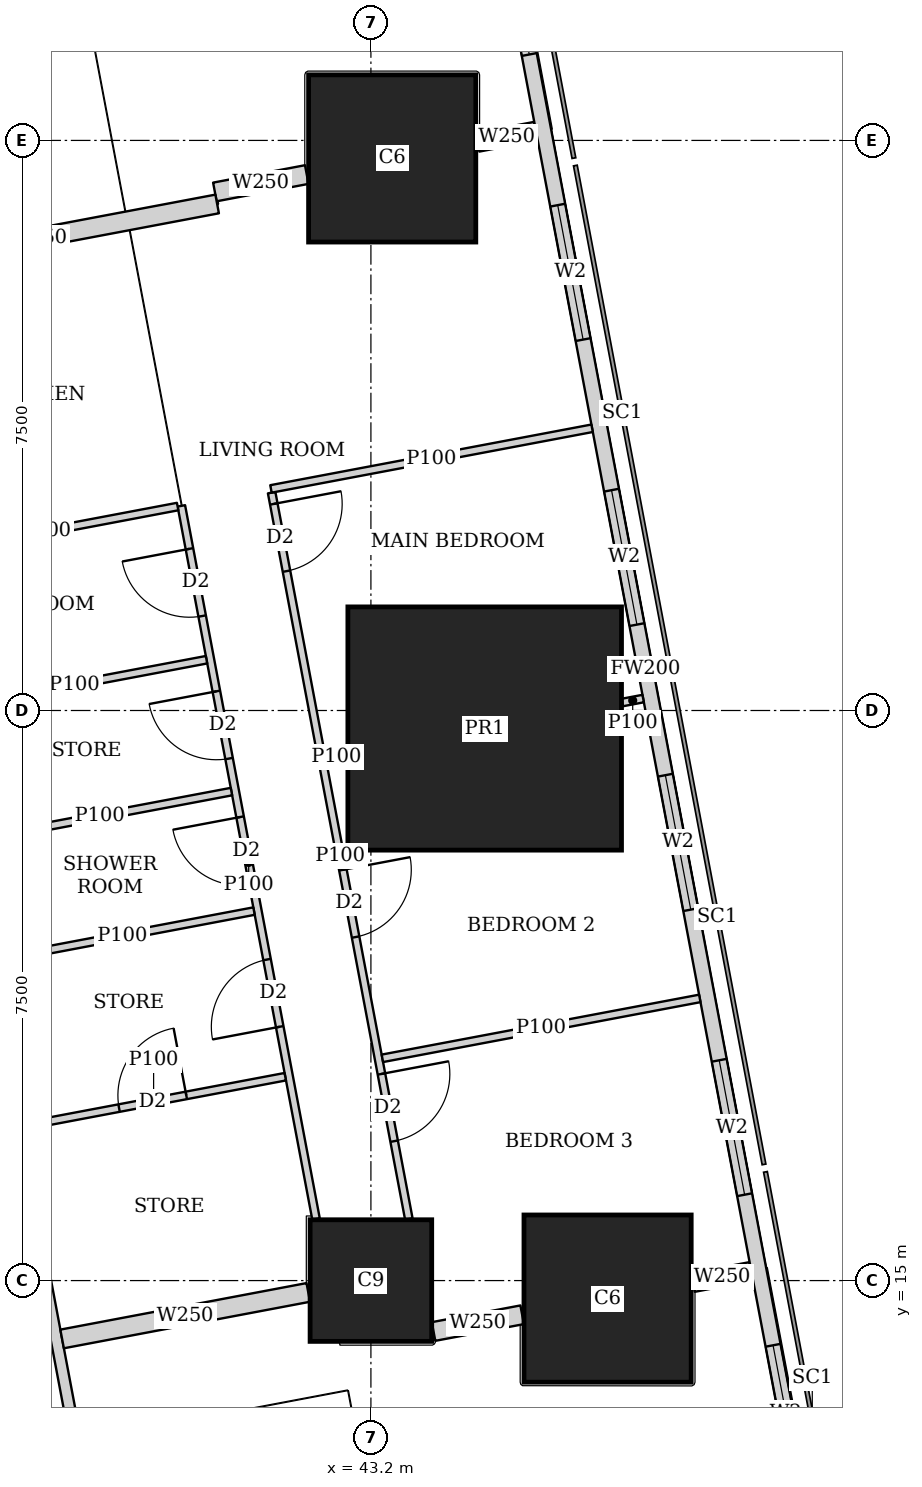
"""IFC4 building model, lengths in metres.
Left out: names, types, materials, properties, quantities, classifications, styles, units other than length and angle.
Written with IfcOpenShell. Run it as: python <this file> out.ifc"""

import sys

from ifc_helpers import new_model, si_unit, direction, frame, frame_2d, origin, origin_2d, place, context, subcontext, project, spatial, rectangle, extrude, element, fill, save


model = new_model("IFC4")
c1 = context("Model", 3, precision=1e-05, world=origin(), true_north=direction((0.0, 1.0)))
c2 = subcontext(c1, "Body", "Model", "MODEL_VIEW")
j1 = project(units=[si_unit("LENGTHUNIT", "METRE"), si_unit("PLANEANGLEUNIT", "RADIAN")], contexts=[c1])
p1 = place(None, origin())
s1 = spatial("IfcSite", under=j1, at=p1, CompositionType="ELEMENT")
p2 = place(p1, origin())
s2 = spatial("IfcBuilding", under=s1, at=p2, CompositionType="ELEMENT")
p3 = place(p2, frame((0.0, 0.0, 89.15)))
s3 = spatial("IfcBuildingStorey", under=s2, at=p3, CompositionType="ELEMENT", Elevation=89.15)
p4 = place(p3, frame((43.2, 15.0, 0.0), z_axis=(0.0, 0.0, 1.0), x_axis=(1.0, 0.0, 0.0)))
e1 = element("IfcColumn", 1, at=p4, inside=s3, PredefinedType="COLUMN", context=c2, shape_type="SweptSolid", body=[
    extrude(rectangle(XDim=1.6, YDim=1.6, at=origin_2d()), origin(), (0.0, 0.0, 1.0), 3.75),
])
p5 = place(p3, frame((46.314, 14.763, 0.0), z_axis=(0.0, 0.0, 1.0), x_axis=(1.0, 0.0, 0.0)))
e2 = element("IfcColumn", 2, at=p5, inside=s3, PredefinedType="COLUMN", context=c2, shape_type="SweptSolid", body=[
    extrude(rectangle(XDim=2.2, YDim=2.2, at=origin_2d()), origin(), (0.0, 0.0, 1.0), 3.75),
])
p6 = place(p3, frame((44.697, 22.263, 0.0), z_axis=(0.0, 0.0, 1.0), x_axis=(1.0, 0.0, 0.0)))
e3 = element("IfcColumn", 3, at=p6, inside=s3, PredefinedType="COLUMN", context=c2, shape_type="SweptSolid", body=[
    extrude(rectangle(XDim=3.6, YDim=3.2, at=origin_2d()), origin(), (0.0, 0.0, 1.0), 3.75),
])
p7 = place(p3, frame((43.48, 29.763, 0.0), z_axis=(0.0, 0.0, 1.0), x_axis=(1.0, 0.0, 0.0)))
e4 = element("IfcColumn", 4, at=p7, inside=s3, PredefinedType="COLUMN", context=c2, shape_type="SweptSolid", body=[
    extrude(rectangle(XDim=2.2, YDim=2.2, at=origin_2d()), origin(), (0.0, 0.0, 1.0), 3.75),
])
p8 = place(p3, frame((50.653, 2.703, 0.0), z_axis=(0.0, 0.0, 1.0), x_axis=(-0.185612026696, 0.982623109613, 0.0)))
e5 = element("IfcWall", 5, at=p8, inside=s3, PredefinedType="SOLIDWALL", context=c2, shape_type="SweptSolid", body=[
    extrude(rectangle(XDim=41.393, YDim=0.2, at=frame_2d((20.697, 0.0))), origin(), (0.0, 0.0, 1.0), 3.5),
])
p9 = place(p8, frame((1.633, 0.0, 0.9)))
e6 = element("IfcOpeningElement", 6, at=p9, cuts=e5, PredefinedType="OPENING", context=c2, shape_type="SweptSolid", body=[
    extrude(rectangle(XDim=1.8, YDim=1.5, at=frame_2d((0.9, 0.75))), frame((0.0, 0.11, 0.0), z_axis=(0.0, -1.0, 0.0), x_axis=(1.0, 0.0, 0.0)), (0.0, 0.0, 1.0), 0.22),
])
p10 = place(p8, frame((6.032, 0.0, 0.9)))
e7 = element("IfcOpeningElement", 7, at=p10, cuts=e5, PredefinedType="OPENING", context=c2, shape_type="SweptSolid", body=[
    extrude(rectangle(XDim=1.8, YDim=1.5, at=frame_2d((0.9, 0.75))), frame((0.0, 0.11, 0.0), z_axis=(0.0, -1.0, 0.0), x_axis=(1.0, 0.0, 0.0)), (0.0, 0.0, 1.0), 0.22),
])
p11 = place(p8, frame((9.848, 0.0, 0.9)))
e8 = element("IfcOpeningElement", 8, at=p11, cuts=e5, PredefinedType="OPENING", context=c2, shape_type="SweptSolid", body=[
    extrude(rectangle(XDim=1.8, YDim=1.5, at=frame_2d((0.9, 0.75))), frame((0.0, 0.11, 0.0), z_axis=(0.0, -1.0, 0.0), x_axis=(1.0, 0.0, 0.0)), (0.0, 0.0, 1.0), 0.22),
])
p12 = place(p8, frame((13.664, 0.0, 0.9)))
e9 = element("IfcOpeningElement", 9, at=p12, cuts=e5, PredefinedType="OPENING", context=c2, shape_type="SweptSolid", body=[
    extrude(rectangle(XDim=1.8, YDim=1.5, at=frame_2d((0.9, 0.75))), frame((0.0, 0.11, 0.0), z_axis=(0.0, -1.0, 0.0), x_axis=(1.0, 0.0, 0.0)), (0.0, 0.0, 1.0), 0.22),
])
p13 = place(p8, frame((17.481, 0.0, 0.9)))
e10 = element("IfcOpeningElement", 10, at=p13, cuts=e5, PredefinedType="OPENING", context=c2, shape_type="SweptSolid", body=[
    extrude(rectangle(XDim=1.8, YDim=1.5, at=frame_2d((0.9, 0.75))), frame((0.0, 0.11, 0.0), z_axis=(0.0, -1.0, 0.0), x_axis=(1.0, 0.0, 0.0)), (0.0, 0.0, 1.0), 0.22),
])
p14 = place(p8, frame((21.297, 0.0, 0.9)))
e11 = element("IfcOpeningElement", 11, at=p14, cuts=e5, PredefinedType="OPENING", context=c2, shape_type="SweptSolid", body=[
    extrude(rectangle(XDim=1.8, YDim=1.5, at=frame_2d((0.9, 0.75))), frame((0.0, 0.11, 0.0), z_axis=(0.0, -1.0, 0.0), x_axis=(1.0, 0.0, 0.0)), (0.0, 0.0, 1.0), 0.22),
])
p15 = place(p8, frame((25.113, 0.0, 0.9)))
e12 = element("IfcOpeningElement", 12, at=p15, cuts=e5, PredefinedType="OPENING", context=c2, shape_type="SweptSolid", body=[
    extrude(rectangle(XDim=1.8, YDim=1.5, at=frame_2d((0.9, 0.75))), frame((0.0, 0.11, 0.0), z_axis=(0.0, -1.0, 0.0), x_axis=(1.0, 0.0, 0.0)), (0.0, 0.0, 1.0), 0.22),
])
p16 = place(p8, frame((28.93, 0.0, 0.9)))
e13 = element("IfcOpeningElement", 13, at=p16, cuts=e5, PredefinedType="OPENING", context=c2, shape_type="SweptSolid", body=[
    extrude(rectangle(XDim=1.8, YDim=1.5, at=frame_2d((0.9, 0.75))), frame((0.0, 0.11, 0.0), z_axis=(0.0, -1.0, 0.0), x_axis=(1.0, 0.0, 0.0)), (0.0, 0.0, 1.0), 0.22),
])
p17 = place(p8, frame((32.746, 0.0, 0.9)))
e14 = element("IfcOpeningElement", 14, at=p17, cuts=e5, PredefinedType="OPENING", context=c2, shape_type="SweptSolid", body=[
    extrude(rectangle(XDim=1.8, YDim=1.5, at=frame_2d((0.9, 0.75))), frame((0.0, 0.11, 0.0), z_axis=(0.0, -1.0, 0.0), x_axis=(1.0, 0.0, 0.0)), (0.0, 0.0, 1.0), 0.22),
])
p18 = place(p8, frame((36.481, 0.0, 0.9)))
e15 = element("IfcOpeningElement", 15, at=p18, cuts=e5, PredefinedType="OPENING", context=c2, shape_type="SweptSolid", body=[
    extrude(rectangle(XDim=1.8, YDim=1.5, at=frame_2d((0.9, 0.75))), frame((0.0, 0.11, 0.0), z_axis=(0.0, -1.0, 0.0), x_axis=(1.0, 0.0, 0.0)), (0.0, 0.0, 1.0), 0.22),
])
p19 = place(p3, frame((33.127, 45.65, 0.0), z_axis=(0.0, 0.0, 1.0), x_axis=(0.185598547723, -0.98262565562, 0.0)))
e16 = element("IfcWall", 16, at=p19, inside=s3, PredefinedType="SOLIDWALL", context=c2, shape_type="SweptSolid", body=[
    extrude(rectangle(XDim=47.118, YDim=0.15, at=frame_2d((23.559, 0.0))), origin(), (0.0, 0.0, 1.0), 2.2),
])
p20 = place(p19, frame((15.285, 0.0, 0.0)))
e17 = element("IfcOpeningElement", 17, at=p20, cuts=e16, PredefinedType="OPENING", context=c2, shape_type="SweptSolid", body=[
    extrude(rectangle(XDim=1.0, YDim=2.1, at=frame_2d((0.5, 1.05))), frame((0.0, 0.085, 0.0), z_axis=(0.0, -1.0, 0.0), x_axis=(1.0, 0.0, 0.0)), (0.0, 0.0, 1.0), 0.17),
])
p21 = place(p19, frame((19.102, 0.0, 0.0)))
e18 = element("IfcOpeningElement", 18, at=p21, cuts=e16, PredefinedType="OPENING", context=c2, shape_type="SweptSolid", body=[
    extrude(rectangle(XDim=1.0, YDim=2.1, at=frame_2d((0.5, 1.05))), frame((0.0, 0.085, 0.0), z_axis=(0.0, -1.0, 0.0), x_axis=(1.0, 0.0, 0.0)), (0.0, 0.0, 1.0), 0.17),
])
p22 = place(p19, frame((33.88, 0.0, 0.0)))
e19 = element("IfcOpeningElement", 19, at=p22, cuts=e16, PredefinedType="OPENING", context=c2, shape_type="SweptSolid", body=[
    extrude(rectangle(XDim=1.0, YDim=2.1, at=frame_2d((0.5, 1.05))), frame((0.0, 0.085, 0.0), z_axis=(0.0, -1.0, 0.0), x_axis=(1.0, 0.0, 0.0)), (0.0, 0.0, 1.0), 0.17),
])
p23 = place(p3, frame((41.894, 25.366, 0.0), z_axis=(0.0, 0.0, 1.0), x_axis=(0.185599502781, -0.982625475228, 0.0)))
e20 = element("IfcWall", 20, at=p23, inside=s3, PredefinedType="PARTITIONING", context=c2, shape_type="SweptSolid", body=[
    extrude(rectangle(XDim=9.725, YDim=0.1, at=frame_2d((4.862, 0.0))), origin(), (0.0, 0.0, 1.0), 2.5),
])
p24 = place(p23, frame((0.151, 0.0, 0.0)))
e21 = element("IfcOpeningElement", 21, at=p24, cuts=e20, PredefinedType="OPENING", context=c2, shape_type="SweptSolid", body=[
    extrude(rectangle(XDim=0.9, YDim=2.1, at=frame_2d((0.45, 1.05))), frame((0.0, 0.06, 0.0), z_axis=(0.0, -1.0, 0.0), x_axis=(1.0, 0.0, 0.0)), (0.0, 0.0, 1.0), 0.12),
])
p25 = place(p23, frame((5.05, 0.0, 0.0)))
e22 = element("IfcOpeningElement", 22, at=p25, cuts=e20, PredefinedType="OPENING", context=c2, shape_type="SweptSolid", body=[
    extrude(rectangle(XDim=0.9, YDim=2.1, at=frame_2d((0.45, 1.05))), frame((0.0, 0.06, 0.0), z_axis=(0.0, -1.0, 0.0), x_axis=(1.0, 0.0, 0.0)), (0.0, 0.0, 1.0), 0.12),
])
p26 = place(p23, frame((7.783, 0.0, 0.0)))
e23 = element("IfcOpeningElement", 23, at=p26, cuts=e20, PredefinedType="OPENING", context=c2, shape_type="SweptSolid", body=[
    extrude(rectangle(XDim=0.9, YDim=2.1, at=frame_2d((0.45, 1.05))), frame((0.0, 0.06, 0.0), z_axis=(0.0, -1.0, 0.0), x_axis=(1.0, 0.0, 0.0)), (0.0, 0.0, 1.0), 0.12),
])
p27 = place(p3, frame((40.706, 25.192, 0.0), z_axis=(0.0, 0.0, 1.0), x_axis=(0.185591412258, -0.982627003342, 0.0)))
e24 = element("IfcWall", 24, at=p27, inside=s3, PredefinedType="PARTITIONING", context=c2, shape_type="SweptSolid", body=[
    extrude(rectangle(XDim=9.548, YDim=0.1, at=frame_2d((4.774, 0.0))), origin(), (0.0, 0.0, 1.0), 2.5),
])
p28 = place(p27, frame((0.575, 0.0, 0.0)))
e25 = element("IfcOpeningElement", 25, at=p28, cuts=e24, PredefinedType="OPENING", context=c2, shape_type="SweptSolid", body=[
    extrude(rectangle(XDim=0.9, YDim=2.1, at=frame_2d((0.45, 1.05))), frame((0.0, 0.06, 0.0), z_axis=(0.0, -1.0, 0.0), x_axis=(1.0, 0.0, 0.0)), (0.0, 0.0, 1.0), 0.12),
])
p29 = place(p27, frame((4.166, 0.0, 0.0)))
e26 = element("IfcOpeningElement", 26, at=p29, cuts=e24, PredefinedType="OPENING", context=c2, shape_type="SweptSolid", body=[
    extrude(rectangle(XDim=0.9, YDim=2.1, at=frame_2d((0.45, 1.05))), frame((0.0, 0.06, 0.0), z_axis=(0.0, -1.0, 0.0), x_axis=(1.0, 0.0, 0.0)), (0.0, 0.0, 1.0), 0.12),
])
p30 = place(p27, frame((2.483, 0.0, 0.0)))
e27 = element("IfcOpeningElement", 27, at=p30, cuts=e24, PredefinedType="OPENING", context=c2, shape_type="SweptSolid", body=[
    extrude(rectangle(XDim=0.9, YDim=2.1, at=frame_2d((0.45, 1.05))), frame((0.0, 0.06, 0.0), z_axis=(0.0, -1.0, 0.0), x_axis=(1.0, 0.0, 0.0)), (0.0, 0.0, 1.0), 0.12),
])
p31 = place(p27, frame((6.074, 0.0, 0.0)))
e28 = element("IfcOpeningElement", 28, at=p31, cuts=e24, PredefinedType="OPENING", context=c2, shape_type="SweptSolid", body=[
    extrude(rectangle(XDim=0.9, YDim=2.1, at=frame_2d((0.45, 1.05))), frame((0.0, 0.06, 0.0), z_axis=(0.0, -1.0, 0.0), x_axis=(1.0, 0.0, 0.0)), (0.0, 0.0, 1.0), 0.12),
])
p32 = place(p3, frame((46.11, 26.213, 0.0), z_axis=(0.0, 0.0, 1.0), x_axis=(-0.982633535512, -0.185556823879, 0.0)))
e29 = element("IfcWall", 29, at=p32, inside=s3, PredefinedType="PARTITIONING", context=c2, shape_type="SweptSolid", body=[
    extrude(rectangle(XDim=4.3, YDim=0.1, at=frame_2d((2.15, 0.0))), origin(), (0.0, 0.0, 1.0), 2.2),
])
p33 = place(p3, frame((46.782, 22.657, 0.0), z_axis=(0.0, 0.0, 1.0), x_axis=(-0.982574553168, -0.185868898601, 0.0)))
e30 = element("IfcWall", 30, at=p33, inside=s3, PredefinedType="PARTITIONING", context=c2, shape_type="SweptSolid", body=[
    extrude(rectangle(XDim=0.28, YDim=0.1, at=frame_2d((0.14, 0.0))), origin(), (0.0, 0.0, 1.0), 3.5),
])
p34 = place(p3, frame((42.887, 21.921, 0.0), z_axis=(0.0, 0.0, 1.0), x_axis=(-0.982688058078, -0.185267861514, 0.0)))
e31 = element("IfcWall", 31, at=p34, inside=s3, PredefinedType="PARTITIONING", context=c2, shape_type="SweptSolid", body=[
    extrude(rectangle(XDim=0.286, YDim=0.1, at=frame_2d((0.143, 0.0))), origin(), (0.0, 0.0, 1.0), 2.5),
])
p35 = place(p3, frame((47.527, 18.712, 0.0), z_axis=(0.0, 0.0, 1.0), x_axis=(-0.982665405803, -0.185387972203, 0.0)))
e32 = element("IfcWall", 32, at=p35, inside=s3, PredefinedType="PARTITIONING", context=c2, shape_type="SweptSolid", body=[
    extrude(rectangle(XDim=4.25, YDim=0.1, at=frame_2d((2.125, 0.0))), origin(), (0.0, 0.0, 1.0), 2.2),
])
p36 = place(p3, frame((40.657, 25.183, 0.0), z_axis=(0.0, 0.0, 1.0), x_axis=(-0.982585626838, -0.185810349366, 0.0)))
e33 = element("IfcWall", 33, at=p36, inside=s3, PredefinedType="PARTITIONING", context=c2, shape_type="SweptSolid", body=[
    extrude(rectangle(XDim=3.525, YDim=0.1, at=frame_2d((1.763, 0.0))), origin(), (0.0, 0.0, 1.0), 3.5),
])
p37 = place(p3, frame((41.365, 21.433, 0.0), z_axis=(0.0, 0.0, 1.0), x_axis=(-0.982638553676, -0.185530247748, 0.0)))
e34 = element("IfcWall", 34, at=p37, inside=s3, PredefinedType="PARTITIONING", context=c2, shape_type="SweptSolid", body=[
    extrude(rectangle(XDim=3.525, YDim=0.1, at=frame_2d((1.763, 0.0))), origin(), (0.0, 0.0, 1.0), 3.5),
])
p38 = place(p3, frame((42.073, 17.682, 0.0), z_axis=(0.0, 0.0, 1.0), x_axis=(-0.98265117712, -0.185463376723, 0.0)))
e35 = element("IfcWall", 35, at=p38, inside=s3, PredefinedType="PARTITIONING", context=c2, shape_type="SweptSolid", body=[
    extrude(rectangle(XDim=3.525, YDim=0.1, at=frame_2d((1.763, 0.0))), origin(), (0.0, 0.0, 1.0), 3.5),
])
p39 = place(p38, frame((1.325, 0.0, 0.0)))
e36 = element("IfcOpeningElement", 36, at=p39, cuts=e35, PredefinedType="OPENING", context=c2, shape_type="SweptSolid", body=[
    extrude(rectangle(XDim=0.9, YDim=2.1, at=frame_2d((0.45, 1.05))), frame((0.0, 0.06, 0.0), z_axis=(0.0, -1.0, 0.0), x_axis=(1.0, 0.0, 0.0)), (0.0, 0.0, 1.0), 0.12),
])
p40 = place(p3, frame((41.037, 23.168, 0.0), z_axis=(0.0, 0.0, 1.0), x_axis=(-0.982638553676, -0.185530247748, 0.0)))
e37 = element("IfcWall", 37, at=p40, inside=s3, PredefinedType="PARTITIONING", context=c2, shape_type="SweptSolid", body=[
    extrude(rectangle(XDim=3.525, YDim=0.1, at=frame_2d((1.763, 0.0))), origin(), (0.0, 0.0, 1.0), 2.5),
])
p41 = place(p3, frame((41.662, 19.861, 0.0), z_axis=(0.0, 0.0, 1.0), x_axis=(-0.982588017646, -0.185797706064, 0.0)))
e38 = element("IfcWall", 38, at=p41, inside=s3, PredefinedType="PARTITIONING", context=c2, shape_type="SweptSolid", body=[
    extrude(rectangle(XDim=3.525, YDim=0.1, at=frame_2d((1.763, 0.0))), origin(), (0.0, 0.0, 1.0), 3.5),
])
p42 = place(p3, frame((45.372, 30.121, 0.0), z_axis=(0.0, 0.0, 1.0), x_axis=(-0.982638023929, -0.185533053469, 0.0)))
e39 = element("IfcWall", 39, at=p42, inside=s3, PredefinedType="SOLIDWALL", context=c2, shape_type="SweptSolid", body=[
    extrude(rectangle(XDim=0.782, YDim=0.25, at=frame_2d((0.391, 0.0))), origin(), (0.0, 0.0, 1.0), 3.5),
])
p43 = place(p3, frame((42.356, 29.551, 0.0), z_axis=(0.0, 0.0, 1.0), x_axis=(-0.982529084329, -0.186109103615, 0.0)))
e40 = element("IfcWall", 40, at=p43, inside=s3, PredefinedType="SOLIDWALL", context=c2, shape_type="SweptSolid", body=[
    extrude(rectangle(XDim=1.23, YDim=0.25, at=frame_2d((0.615, 0.0))), origin(), (0.0, 0.0, 1.0), 2.5),
])
p44 = place(p3, frame((41.177, 29.164, 0.0), z_axis=(0.0, 0.0, 1.0), x_axis=(-0.982642846239, -0.185507511263, 0.0)))
e41 = element("IfcWall", 41, at=p44, inside=s3, PredefinedType="SOLIDWALL", context=c2, shape_type="SweptSolid", body=[
    extrude(rectangle(XDim=4.776, YDim=0.25, at=frame_2d((2.388, 0.0))), origin(), (0.0, 0.0, 1.0), 2.5),
])
p45 = place(p3, frame((48.206, 15.12, 0.0), z_axis=(0.0, 0.0, 1.0), x_axis=(-0.982638023929, -0.185533053469, 0.0)))
e42 = element("IfcWall", 42, at=p45, inside=s3, PredefinedType="SOLIDWALL", context=c2, shape_type="SweptSolid", body=[
    extrude(rectangle(XDim=0.782, YDim=0.25, at=frame_2d((0.391, 0.0))), origin(), (0.0, 0.0, 1.0), 3.5),
])
p46 = place(p3, frame((45.19, 14.55, 0.0), z_axis=(0.0, 0.0, 1.0), x_axis=(-0.982666604435, -0.185381618634, 0.0)))
e43 = element("IfcWall", 43, at=p46, inside=s3, PredefinedType="SOLIDWALL", context=c2, shape_type="SweptSolid", body=[
    extrude(rectangle(XDim=1.187, YDim=0.25, at=frame_2d((0.593, 0.0))), origin(), (0.0, 0.0, 1.0), 3.5),
])
p47 = place(p3, frame((42.376, 14.844, 0.0), z_axis=(0.0, 0.0, 1.0), x_axis=(-0.982610440948, -0.18567908159, 0.0)))
e44 = element("IfcWall", 44, at=p47, inside=s3, PredefinedType="SOLIDWALL", context=c2, shape_type="SweptSolid", body=[
    extrude(rectangle(XDim=3.296, YDim=0.25, at=frame_2d((1.648, 0.0))), origin(), (0.0, 0.0, 1.0), 3.5),
])
p48 = place(p11, origin())
e45 = element("IfcWindow", 45, at=p48, inside=s3, PartitioningType="SINGLE_PANEL", PredefinedType="WINDOW", context=c2, shape_type="SweptSolid", body=[
    extrude(rectangle(XDim=1.8, YDim=1.5, at=frame_2d((0.9, 0.75))), frame((0.0, 0.03, 0.0), z_axis=(0.0, -1.0, 0.0), x_axis=(1.0, 0.0, 0.0)), (0.0, 0.0, 1.0), 0.06),
])
fill(e8, e45)
p49 = place(p12, origin())
e46 = element("IfcWindow", 46, at=p49, inside=s3, PartitioningType="SINGLE_PANEL", PredefinedType="WINDOW", context=c2, shape_type="SweptSolid", body=[
    extrude(rectangle(XDim=1.8, YDim=1.5, at=frame_2d((0.9, 0.75))), frame((0.0, 0.03, 0.0), z_axis=(0.0, -1.0, 0.0), x_axis=(1.0, 0.0, 0.0)), (0.0, 0.0, 1.0), 0.06),
])
fill(e9, e46)
p50 = place(p13, origin())
e47 = element("IfcWindow", 47, at=p50, inside=s3, PartitioningType="SINGLE_PANEL", PredefinedType="WINDOW", context=c2, shape_type="SweptSolid", body=[
    extrude(rectangle(XDim=1.8, YDim=1.5, at=frame_2d((0.9, 0.75))), frame((0.0, 0.03, 0.0), z_axis=(0.0, -1.0, 0.0), x_axis=(1.0, 0.0, 0.0)), (0.0, 0.0, 1.0), 0.06),
])
fill(e10, e47)
p51 = place(p14, origin())
e48 = element("IfcWindow", 48, at=p51, inside=s3, PartitioningType="SINGLE_PANEL", PredefinedType="WINDOW", context=c2, shape_type="SweptSolid", body=[
    extrude(rectangle(XDim=1.8, YDim=1.5, at=frame_2d((0.9, 0.75))), frame((0.0, 0.03, 0.0), z_axis=(0.0, -1.0, 0.0), x_axis=(1.0, 0.0, 0.0)), (0.0, 0.0, 1.0), 0.06),
])
fill(e11, e48)
p52 = place(p15, origin())
e49 = element("IfcWindow", 49, at=p52, inside=s3, PartitioningType="SINGLE_PANEL", PredefinedType="WINDOW", context=c2, shape_type="SweptSolid", body=[
    extrude(rectangle(XDim=1.8, YDim=1.5, at=frame_2d((0.9, 0.75))), frame((0.0, 0.03, 0.0), z_axis=(0.0, -1.0, 0.0), x_axis=(1.0, 0.0, 0.0)), (0.0, 0.0, 1.0), 0.06),
])
fill(e12, e49)
p53 = place(p16, origin())
e50 = element("IfcWindow", 50, at=p53, inside=s3, PartitioningType="SINGLE_PANEL", PredefinedType="WINDOW", context=c2, shape_type="SweptSolid", body=[
    extrude(rectangle(XDim=1.8, YDim=1.5, at=frame_2d((0.9, 0.75))), frame((0.0, 0.03, 0.0), z_axis=(0.0, -1.0, 0.0), x_axis=(1.0, 0.0, 0.0)), (0.0, 0.0, 1.0), 0.06),
])
fill(e13, e50)
p54 = place(p24, origin())
e51 = element("IfcDoor", 51, at=p54, inside=s3, OperationType="SINGLE_SWING_LEFT", PredefinedType="DOOR", context=c2, shape_type="SweptSolid", body=[
    extrude(rectangle(XDim=0.9, YDim=2.1, at=frame_2d((0.45, 1.05))), frame((0.0, 0.025, 0.0), z_axis=(0.0, -1.0, 0.0), x_axis=(1.0, 0.0, 0.0)), (0.0, 0.0, 1.0), 0.05),
])
fill(e21, e51)
p55 = place(p25, origin())
e52 = element("IfcDoor", 52, at=p55, inside=s3, OperationType="SINGLE_SWING_LEFT", PredefinedType="DOOR", context=c2, shape_type="SweptSolid", body=[
    extrude(rectangle(XDim=0.9, YDim=2.1, at=frame_2d((0.45, 1.05))), frame((0.0, 0.025, 0.0), z_axis=(0.0, -1.0, 0.0), x_axis=(1.0, 0.0, 0.0)), (0.0, 0.0, 1.0), 0.05),
])
fill(e22, e52)
p56 = place(p26, origin())
e53 = element("IfcDoor", 53, at=p56, inside=s3, OperationType="SINGLE_SWING_LEFT", PredefinedType="DOOR", context=c2, shape_type="SweptSolid", body=[
    extrude(rectangle(XDim=0.9, YDim=2.1, at=frame_2d((0.45, 1.05))), frame((0.0, 0.025, 0.0), z_axis=(0.0, -1.0, 0.0), x_axis=(1.0, 0.0, 0.0)), (0.0, 0.0, 1.0), 0.05),
])
fill(e23, e53)
p57 = place(p28, origin())
e54 = element("IfcDoor", 54, at=p57, inside=s3, OperationType="SINGLE_SWING_RIGHT", PredefinedType="DOOR", context=c2, shape_type="SweptSolid", body=[
    extrude(rectangle(XDim=0.9, YDim=2.1, at=frame_2d((0.45, 1.05))), frame((0.0, 0.025, 0.0), z_axis=(0.0, -1.0, 0.0), x_axis=(1.0, 0.0, 0.0)), (0.0, 0.0, 1.0), 0.05),
])
fill(e25, e54)
p58 = place(p29, origin())
e55 = element("IfcDoor", 55, at=p58, inside=s3, OperationType="SINGLE_SWING_RIGHT", PredefinedType="DOOR", context=c2, shape_type="SweptSolid", body=[
    extrude(rectangle(XDim=0.9, YDim=2.1, at=frame_2d((0.45, 1.05))), frame((0.0, 0.025, 0.0), z_axis=(0.0, -1.0, 0.0), x_axis=(1.0, 0.0, 0.0)), (0.0, 0.0, 1.0), 0.05),
])
fill(e26, e55)
p59 = place(p30, origin())
e56 = element("IfcDoor", 56, at=p59, inside=s3, OperationType="SINGLE_SWING_RIGHT", PredefinedType="DOOR", context=c2, shape_type="SweptSolid", body=[
    extrude(rectangle(XDim=0.9, YDim=2.1, at=frame_2d((0.45, 1.05))), frame((0.0, 0.025, 0.0), z_axis=(0.0, -1.0, 0.0), x_axis=(1.0, 0.0, 0.0)), (0.0, 0.0, 1.0), 0.05),
])
fill(e27, e56)
p60 = place(p31, origin())
e57 = element("IfcDoor", 57, at=p60, inside=s3, OperationType="SINGLE_SWING_LEFT", PredefinedType="DOOR", context=c2, shape_type="SweptSolid", body=[
    extrude(rectangle(XDim=0.9, YDim=2.1, at=frame_2d((0.45, 1.05))), frame((0.0, 0.025, 0.0), z_axis=(0.0, -1.0, 0.0), x_axis=(1.0, 0.0, 0.0)), (0.0, 0.0, 1.0), 0.05),
])
fill(e28, e57)
p61 = place(p39, origin())
e58 = element("IfcDoor", 58, at=p61, inside=s3, OperationType="SINGLE_SWING_RIGHT", PredefinedType="DOOR", context=c2, shape_type="SweptSolid", body=[
    extrude(rectangle(XDim=0.9, YDim=2.1, at=frame_2d((0.45, 1.05))), frame((0.0, 0.025, 0.0), z_axis=(0.0, -1.0, 0.0), x_axis=(1.0, 0.0, 0.0)), (0.0, 0.0, 1.0), 0.05),
])
fill(e36, e58)
save(model, sys.argv[1])
